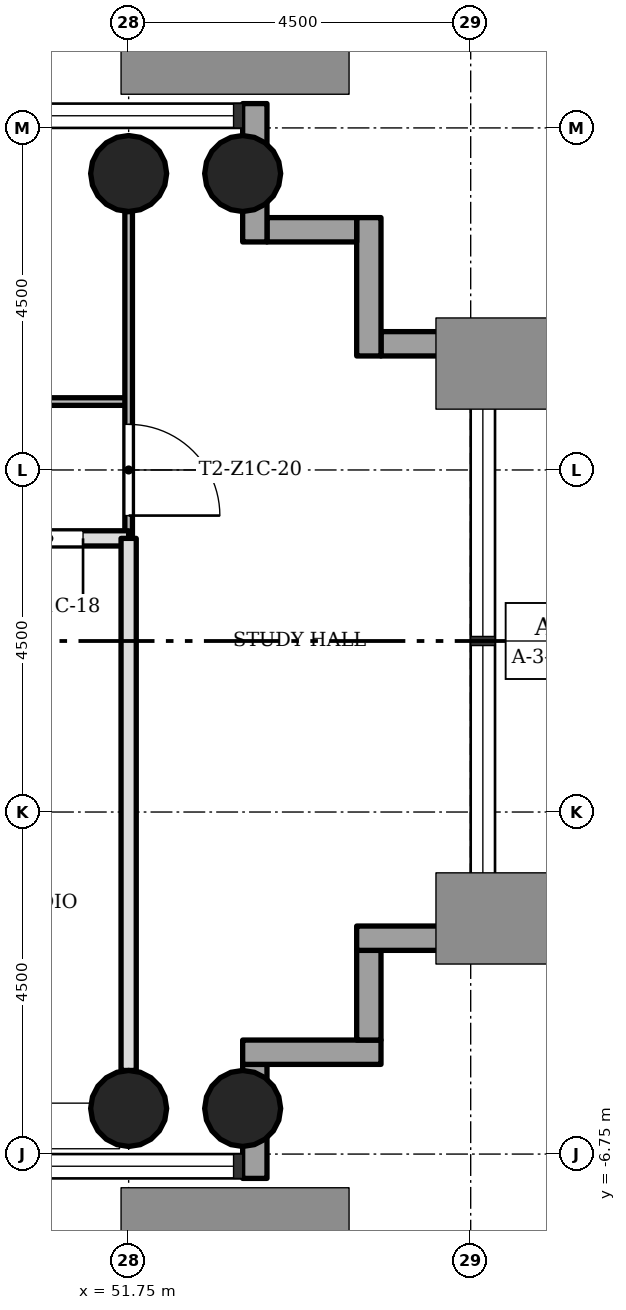
"""IFC4 building model, lengths in metres.
Left out: names, types, materials, properties, quantities, classifications, styles, units other than length and angle.
Written with IfcOpenShell. Run it as: python <this file> out.ifc"""

import sys

from ifc_helpers import new_model, si_unit, direction, frame, frame_2d, origin, origin_2d, place, context, subcontext, project, spatial, rectangle, hollow_circle, extrude, element, fill, save


model = new_model("IFC4")
c1 = context("Model", 3, precision=1e-05, world=origin(), true_north=direction((0.0, 1.0)))
c2 = subcontext(c1, "Body", "Model", "MODEL_VIEW")
j1 = project(units=[si_unit("LENGTHUNIT", "METRE"), si_unit("PLANEANGLEUNIT", "RADIAN")], contexts=[c1])
p1 = place(None, origin())
s1 = spatial("IfcSite", under=j1, at=p1, CompositionType="ELEMENT")
p2 = place(p1, origin())
s2 = spatial("IfcBuilding", under=s1, at=p2, CompositionType="ELEMENT")
p3 = place(p2, frame((0.0, 0.0, 44.9)))
s3 = spatial("IfcBuildingStorey", under=s2, at=p3, CompositionType="ELEMENT", Elevation=44.9)
for number, where, z_axis, x_axis in (
    (1, (51.75, -6.15, 0.0), (0.0, 0.0, 1.0), (1.0, 0.0, 0.0)),
    (2, (51.75, 6.15, 0.0), (0.0, 0.0, 1.0), (1.0, 0.0, 0.0)),
    (3, (53.25, -6.15, 0.0), (0.0, 0.0, 1.0), (1.0, 0.0, 0.0)),
    (4, (53.25, 6.15, 0.0), (0.0, 0.0, 1.0), (1.0, 0.0, 0.0)),
):
    element("IfcColumn", number, at=place(p3, frame(where, z_axis=z_axis, x_axis=x_axis)), inside=s3, PredefinedType="COLUMN", context=c2, shape_type="SweptSolid", body=[
        extrude(hollow_circle(Radius=0.5, WallThickness=0.036, at=origin_2d()), origin(), (0.0, 0.0, 1.0), 3.4),
    ])
p4 = place(p3, frame((53.41, -7.07, -0.3), z_axis=(0.0, 0.0, 1.0), x_axis=(0.0, 1.0, 0.0)))
e5 = element("IfcWall", 5, at=p4, inside=s3, PredefinedType="STANDARD", context=c2, shape_type="SweptSolid", body=[
    extrude(rectangle(XDim=1.5, YDim=0.32, at=frame_2d((0.75, 0.0))), origin(), (0.0, 0.0, 1.0), 3.4),
])
p5 = place(p3, frame((53.25, -5.41, -0.3), z_axis=(0.0, 0.0, 1.0), x_axis=(1.0, 0.0, 0.0)))
e6 = element("IfcWall", 6, at=p5, inside=s3, PredefinedType="STANDARD", context=c2, shape_type="SweptSolid", body=[
    extrude(rectangle(XDim=1.82, YDim=0.32, at=frame_2d((0.91, 0.0))), origin(), (0.0, 0.0, 1.0), 3.4),
])
p6 = place(p3, frame((54.91, -5.25, -0.3), z_axis=(0.0, 0.0, 1.0), x_axis=(0.0, 1.0, 0.0)))
e7 = element("IfcWall", 7, at=p6, inside=s3, PredefinedType="STANDARD", context=c2, shape_type="SweptSolid", body=[
    extrude(rectangle(XDim=1.18, YDim=0.32, at=frame_2d((0.59, 0.0))), origin(), (0.0, 0.0, 1.0), 3.4),
])
p7 = place(p3, frame((54.75, -3.91, -0.3), z_axis=(0.0, 0.0, 1.0), x_axis=(1.0, 0.0, 0.0)))
e8 = element("IfcWall", 8, at=p7, inside=s3, PredefinedType="STANDARD", context=c2, shape_type="SweptSolid", body=[
    extrude(rectangle(XDim=1.82, YDim=0.32, at=frame_2d((0.91, 0.0))), origin(), (0.0, 0.0, 1.0), 3.4),
])
p8 = place(p3, frame((56.57, 3.91, -0.3), z_axis=(0.0, 0.0, 1.0), x_axis=(-1.0, 0.0, 0.0)))
e9 = element("IfcWall", 9, at=p8, inside=s3, PredefinedType="STANDARD", context=c2, shape_type="SweptSolid", body=[
    extrude(rectangle(XDim=1.5, YDim=0.32, at=frame_2d((0.75, 0.0))), origin(), (0.0, 0.0, 1.0), 3.4),
])
p9 = place(p3, frame((54.91, 3.75, -0.3), z_axis=(0.0, 0.0, 1.0), x_axis=(0.0, 1.0, 0.0)))
e10 = element("IfcWall", 10, at=p9, inside=s3, PredefinedType="STANDARD", context=c2, shape_type="SweptSolid", body=[
    extrude(rectangle(XDim=1.82, YDim=0.32, at=frame_2d((0.91, 0.0))), origin(), (0.0, 0.0, 1.0), 3.4),
])
p10 = place(p3, frame((54.75, 5.41, -0.3), z_axis=(0.0, 0.0, 1.0), x_axis=(-1.0, 0.0, 0.0)))
e11 = element("IfcWall", 11, at=p10, inside=s3, PredefinedType="STANDARD", context=c2, shape_type="SweptSolid", body=[
    extrude(rectangle(XDim=1.18, YDim=0.32, at=frame_2d((0.59, 0.0))), origin(), (0.0, 0.0, 1.0), 3.4),
])
p11 = place(p3, frame((53.41, 5.25, -0.3), z_axis=(0.0, 0.0, 1.0), x_axis=(0.0, 1.0, 0.0)))
e12 = element("IfcWall", 12, at=p11, inside=s3, PredefinedType="STANDARD", context=c2, shape_type="SweptSolid", body=[
    extrude(rectangle(XDim=1.82, YDim=0.32, at=frame_2d((0.91, 0.0))), origin(), (0.0, 0.0, 1.0), 3.4),
])
p12 = place(p3, frame((51.75, 1.35, 0.0), z_axis=(0.0, 0.0, 1.0), x_axis=(-1.0, 0.0, 0.0)))
e13 = element("IfcWall", 13, at=p12, inside=s3, PredefinedType="SOLIDWALL", context=c2, shape_type="SweptSolid", body=[
    extrude(rectangle(XDim=4.5, YDim=0.2, at=frame_2d((2.25, 0.0))), origin(), (0.0, 0.0, 1.0), 3.0),
])
p13 = place(p12, frame((0.6, 0.0, 0.0)))
e14 = element("IfcOpeningElement", 14, at=p13, cuts=e13, PredefinedType="OPENING", context=c2, shape_type="SweptSolid", body=[
    extrude(rectangle(XDim=0.9, YDim=2.1, at=frame_2d((0.45, 1.05))), frame((0.0, 0.11, 0.0), z_axis=(0.0, -1.0, 0.0), x_axis=(1.0, 0.0, 0.0)), (0.0, 0.0, 1.0), 0.22),
])
p14 = place(p3, frame((51.75, 3.15, 0.0), z_axis=(0.0, 0.0, 1.0), x_axis=(-1.0, 0.0, 0.0)))
e15 = element("IfcWall", 15, at=p14, inside=s3, PredefinedType="PARTITIONING", context=c2, shape_type="SweptSolid", body=[
    extrude(rectangle(XDim=9.0, YDim=0.1, at=frame_2d((4.5, 0.0))), origin(), (0.0, 0.0, 1.0), 3.0),
])
p15 = place(p14, frame((6.3, 0.0, 0.0)))
e16 = element("IfcOpeningElement", 16, at=p15, cuts=e15, PredefinedType="OPENING", context=c2, shape_type="SweptSolid", body=[
    extrude(rectangle(XDim=0.9, YDim=2.1, at=frame_2d((0.45, 1.05))), frame((0.0, 0.06, 0.0), z_axis=(0.0, -1.0, 0.0), x_axis=(1.0, 0.0, 0.0)), (0.0, 0.0, 1.0), 0.12),
])
p16 = place(p14, frame((1.8, 0.0, 0.0)))
e17 = element("IfcOpeningElement", 17, at=p16, cuts=e15, PredefinedType="OPENING", context=c2, shape_type="SweptSolid", body=[
    extrude(rectangle(XDim=0.9, YDim=2.1, at=frame_2d((0.45, 1.05))), frame((0.0, 0.06, 0.0), z_axis=(0.0, -1.0, 0.0), x_axis=(1.0, 0.0, 0.0)), (0.0, 0.0, 1.0), 0.12),
])
p17 = place(p3, frame((51.75, 1.35, 0.0), z_axis=(0.0, 0.0, 1.0), x_axis=(0.0, 1.0, 0.0)))
e18 = element("IfcWall", 18, at=p17, inside=s3, PredefinedType="PARTITIONING", context=c2, shape_type="SweptSolid", body=[
    extrude(rectangle(XDim=4.3, YDim=0.1, at=frame_2d((2.15, 0.0))), origin(), (0.0, 0.0, 1.0), 3.0),
])
p18 = place(p17, frame((0.3, 0.0, 0.0)))
e19 = element("IfcOpeningElement", 19, at=p18, cuts=e18, PredefinedType="OPENING", context=c2, shape_type="SweptSolid", body=[
    extrude(rectangle(XDim=1.2, YDim=2.1, at=frame_2d((0.6, 1.05))), frame((0.0, 0.06, 0.0), z_axis=(0.0, -1.0, 0.0), x_axis=(1.0, 0.0, 0.0)), (0.0, 0.0, 1.0), 0.12),
])
p19 = place(p3, frame((51.75, -5.65, 0.0), z_axis=(0.0, 0.0, 1.0), x_axis=(0.0, 1.0, 0.0)))
e20 = element("IfcWall", 20, at=p19, inside=s3, PredefinedType="SOLIDWALL", context=c2, shape_type="SweptSolid", body=[
    extrude(rectangle(XDim=7.0, YDim=0.2, at=frame_2d((3.5, 0.0))), origin(), (0.0, 0.0, 1.0), 3.0),
])
p20 = place(p13, origin())
e21 = element("IfcDoor", 21, at=p20, inside=s3, OperationType="SINGLE_SWING_RIGHT", PredefinedType="DOOR", context=c2, shape_type="SweptSolid", body=[
    extrude(rectangle(XDim=0.9, YDim=2.1, at=frame_2d((0.45, 1.05))), frame((0.0, 0.025, 0.0), z_axis=(0.0, -1.0, 0.0), x_axis=(1.0, 0.0, 0.0)), (0.0, 0.0, 1.0), 0.05),
])
fill(e14, e21)
p21 = place(p18, origin())
e22 = element("IfcDoor", 22, at=p21, inside=s3, OperationType="SINGLE_SWING_LEFT", PredefinedType="DOOR", context=c2, shape_type="SweptSolid", body=[
    extrude(rectangle(XDim=1.2, YDim=2.1, at=frame_2d((0.6, 1.05))), frame((0.0, 0.025, 0.0), z_axis=(0.0, -1.0, 0.0), x_axis=(1.0, 0.0, 0.0)), (0.0, 0.0, 1.0), 0.05),
])
fill(e19, e22)
save(model, sys.argv[1])
